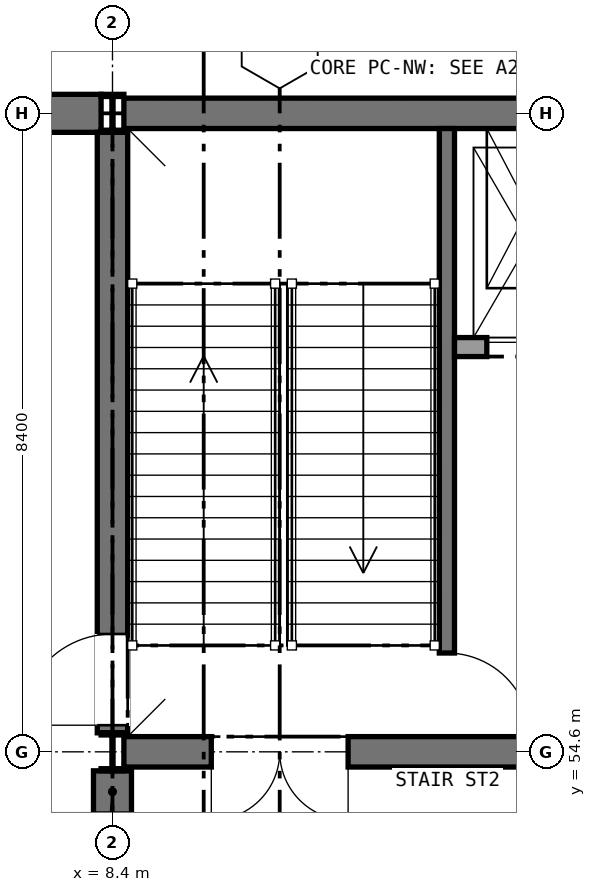
"""IFC4 building model, lengths in metres.
Left out: names, types, materials, properties, quantities, classifications, styles, units other than length and angle.
Written with IfcOpenShell. Run it as: python <this file> out.ifc"""

import sys

from ifc_helpers import new_model, si_unit, direction, frame, frame_2d, origin, origin_2d, place, context, subcontext, project, spatial, rectangle, i_section, extrude, element, fill, save


model = new_model("IFC4")
c1 = context("Model", 3, precision=1e-05, world=origin(), true_north=direction((0.0, 1.0)))
c2 = subcontext(c1, "Body", "Model", "MODEL_VIEW")
j1 = project(units=[si_unit("LENGTHUNIT", "METRE"), si_unit("PLANEANGLEUNIT", "RADIAN")], contexts=[c1])
p1 = place(None, origin())
s1 = spatial("IfcSite", under=j1, at=p1, CompositionType="ELEMENT")
p2 = place(p1, origin())
s2 = spatial("IfcBuilding", under=s1, at=p2, CompositionType="ELEMENT")
p3 = place(p2, origin())
s3 = spatial("IfcBuildingStorey", under=s2, at=p3, CompositionType="ELEMENT", Elevation=0.0)
p4 = place(p3, frame((0.305, 63.0, 0.0), z_axis=(0.0, 0.0, 1.0), x_axis=(1.0, 0.0, 0.0)))
e1 = element("IfcWall", 1, at=p4, inside=s3, PredefinedType="SHEAR", context=c2, shape_type="SweptSolid", body=[
    extrude(rectangle(XDim=7.945, YDim=0.5, at=frame_2d((3.973, 0.0))), origin(), (0.0, 0.0, 1.0), 6.0),
])
p5 = place(p3, frame((8.55, 63.0, 0.0), z_axis=(0.0, 0.0, 1.0), x_axis=(1.0, 0.0, 0.0)))
e2 = element("IfcWall", 2, at=p5, inside=s3, PredefinedType="SHEAR", context=c2, shape_type="SweptSolid", body=[
    extrude(rectangle(XDim=8.1, YDim=0.4, at=frame_2d((4.05, 0.0))), origin(), (0.0, 0.0, 1.0), 5.85),
])
p6 = place(p3, frame((8.55, 54.6, 0.0), z_axis=(0.0, 0.0, 1.0), x_axis=(1.0, 0.0, 0.0)))
e3 = element("IfcWall", 3, at=p6, inside=s3, PredefinedType="SHEAR", context=c2, shape_type="SweptSolid", body=[
    extrude(rectangle(XDim=8.1, YDim=0.4, at=frame_2d((4.05, 0.0))), origin(), (0.0, 0.0, 1.0), 5.85),
])
p7 = place(p6, frame((1.15, 0.0, 0.0)))
e4 = element("IfcOpeningElement", 4, at=p7, cuts=e3, PredefinedType="OPENING", context=c2, shape_type="SweptSolid", body=[
    extrude(rectangle(XDim=1.8, YDim=2.1, at=frame_2d((0.9, 1.05))), frame((0.0, 0.21, 0.0), z_axis=(0.0, -1.0, 0.0), x_axis=(1.0, 0.0, 0.0)), (0.0, 0.0, 1.0), 0.42),
])
p8 = place(p6, frame((5.3, 0.0, 0.0)))
e5 = element("IfcOpeningElement", 5, at=p8, cuts=e3, PredefinedType="OPENING", context=c2, shape_type="SweptSolid", body=[
    extrude(rectangle(XDim=1.8, YDim=2.1, at=frame_2d((0.9, 1.05))), frame((0.0, 0.21, 0.0), z_axis=(0.0, -1.0, 0.0), x_axis=(1.0, 0.0, 0.0)), (0.0, 0.0, 1.0), 0.42),
])
p9 = place(p3, frame((8.4, 54.85, 0.0), z_axis=(0.0, 0.0, 1.0), x_axis=(0.0, 1.0, 0.0)))
e6 = element("IfcWall", 6, at=p9, inside=s3, PredefinedType="SHEAR", context=c2, shape_type="SweptSolid", body=[
    extrude(rectangle(XDim=7.9, YDim=0.4, at=frame_2d((3.95, 0.0))), origin(), (0.0, 0.0, 1.0), 5.85),
])
p10 = place(p9, frame((0.1, 0.0, 0.0)))
e7 = element("IfcOpeningElement", 7, at=p10, cuts=e6, PredefinedType="OPENING", context=c2, shape_type="SweptSolid", body=[
    extrude(rectangle(XDim=1.2, YDim=2.1, at=frame_2d((0.6, 1.05))), frame((0.0, 0.21, 0.0), z_axis=(0.0, -1.0, 0.0), x_axis=(1.0, 0.0, 0.0)), (0.0, 0.0, 1.0), 0.42),
])
for number, where, z_axis, x_axis in (
    (8, (8.4, 54.6, 0.0), (0.0, 0.0, 1.0), (1.0, 0.0, 0.0)),
    (9, (8.4, 63.0, 0.0), (0.0, 0.0, 1.0), (1.0, 0.0, 0.0)),
):
    element("IfcColumn", number, at=place(p3, frame(where, z_axis=z_axis, x_axis=x_axis)), inside=s3, PredefinedType="COLUMN", context=c2, shape_type="SweptSolid", body=[
        extrude(i_section(OverallWidth=0.3, OverallDepth=0.5, WebThickness=0.014, FlangeThickness=0.028, FilletRadius=0.027, at=origin_2d()), origin(), (0.0, 0.0, 1.0), 6.0),
    ])
p11 = place(p3, frame((8.4, 46.45, 0.0), z_axis=(0.0, 0.0, 1.0), x_axis=(0.0, 1.0, 0.0)))
e10 = element("IfcWall", 10, at=p11, inside=s3, PredefinedType="STANDARD", context=c2, shape_type="SweptSolid", body=[
    extrude(rectangle(XDim=7.9, YDim=0.5, at=frame_2d((3.95, 0.0))), origin(), (0.0, 0.0, 1.0), 5.85),
])
p12 = place(p11, frame((0.55, 0.0, 0.0)))
e11 = element("IfcOpeningElement", 11, at=p12, cuts=e10, PredefinedType="OPENING", context=c2, shape_type="SweptSolid", body=[
    extrude(rectangle(XDim=2.6, YDim=3.0, at=frame_2d((1.3, 1.5))), frame((0.0, 0.26, 0.0), z_axis=(0.0, -1.0, 0.0), x_axis=(1.0, 0.0, 0.0)), (0.0, 0.0, 1.0), 0.52),
])
p13 = place(p11, frame((4.75, 0.0, 0.0)))
e12 = element("IfcOpeningElement", 12, at=p13, cuts=e10, PredefinedType="OPENING", context=c2, shape_type="SweptSolid", body=[
    extrude(rectangle(XDim=2.6, YDim=3.0, at=frame_2d((1.3, 1.5))), frame((0.0, 0.26, 0.0), z_axis=(0.0, -1.0, 0.0), x_axis=(1.0, 0.0, 0.0)), (0.0, 0.0, 1.0), 0.52),
])
p14 = place(p3, frame((12.8, 62.8, 0.0), z_axis=(0.0, 0.0, 1.0), x_axis=(0.0, -1.0, 0.0)))
e13 = element("IfcWall", 13, at=p14, inside=s3, PredefinedType="SHEAR", context=c2, shape_type="SweptSolid", body=[
    extrude(rectangle(XDim=8.0, YDim=0.2, at=frame_2d((4.0, 0.0))), origin(), (0.0, 0.0, 1.0), 5.85),
])
p15 = place(p14, frame((6.9, 0.0, 0.0)))
e14 = element("IfcOpeningElement", 14, at=p15, cuts=e13, PredefinedType="OPENING", context=c2, shape_type="SweptSolid", body=[
    extrude(rectangle(XDim=1.11, YDim=2.1, at=frame_2d((0.555, 1.05))), frame((0.0, 0.11, 0.0), z_axis=(0.0, -1.0, 0.0), x_axis=(1.0, 0.0, 0.0)), (0.0, 0.0, 1.0), 0.22),
])
p16 = place(p3, frame((12.9, 59.925, 0.0), z_axis=(0.0, 0.0, 1.0), x_axis=(1.0, 0.0, 0.0)))
e15 = element("IfcWall", 15, at=p16, inside=s3, PredefinedType="SOLIDWALL", context=c2, shape_type="SweptSolid", body=[
    extrude(rectangle(XDim=1.95, YDim=0.25, at=frame_2d((0.975, 0.0))), origin(), (0.0, 0.0, 1.0), 6.0),
])
p17 = place(p16, frame((0.425, 0.0, 0.0)))
e16 = element("IfcOpeningElement", 16, at=p17, cuts=e15, PredefinedType="OPENING", context=c2, shape_type="SweptSolid", body=[
    extrude(rectangle(XDim=1.1, YDim=2.1, at=frame_2d((0.55, 1.05))), frame((0.0, 0.135, 0.0), z_axis=(0.0, -1.0, 0.0), x_axis=(1.0, 0.0, 0.0)), (0.0, 0.0, 1.0), 0.27),
])
p18 = place(p15, origin())
e17 = element("IfcDoor", 17, at=p18, inside=s3, OperationType="SINGLE_SWING_RIGHT", PredefinedType="DOOR", context=c2, shape_type="SweptSolid", body=[
    extrude(rectangle(XDim=1.1, YDim=2.1, at=frame_2d((0.55, 1.05))), frame((0.0, 0.025, 0.0), z_axis=(0.0, -1.0, 0.0), x_axis=(1.0, 0.0, 0.0)), (0.0, 0.0, 1.0), 0.05),
])
fill(e14, e17)
p19 = place(p17, frame((1.1, 0.0, 0.0), z_axis=(0.0, 0.0, 1.0), x_axis=(-1.0, 0.0, 0.0)))
e18 = element("IfcDoor", 18, at=p19, inside=s3, OperationType="SLIDING_TO_RIGHT", PredefinedType="DOOR", context=c2, shape_type="SweptSolid", body=[
    extrude(rectangle(XDim=1.1, YDim=2.1, at=frame_2d((0.55, 1.05))), frame((0.0, 0.025, 0.0), z_axis=(0.0, -1.0, 0.0), x_axis=(1.0, 0.0, 0.0)), (0.0, 0.0, 1.0), 0.05),
])
fill(e16, e18)
p20 = place(p7, frame((1.8, 0.0, 0.0), z_axis=(0.0, 0.0, 1.0), x_axis=(-1.0, 0.0, 0.0)))
e19 = element("IfcDoor", 19, at=p20, inside=s3, OperationType="DOUBLE_DOOR_SINGLE_SWING", PredefinedType="DOOR", context=c2, shape_type="SweptSolid", body=[
    extrude(rectangle(XDim=1.8, YDim=2.1, at=frame_2d((0.9, 1.05))), frame((0.0, 0.025, 0.0), z_axis=(0.0, -1.0, 0.0), x_axis=(1.0, 0.0, 0.0)), (0.0, 0.0, 1.0), 0.05),
])
fill(e4, e19)
p21 = place(p10, origin())
e20 = element("IfcDoor", 20, at=p21, inside=s3, OperationType="SINGLE_SWING_LEFT", PredefinedType="DOOR", context=c2, shape_type="SweptSolid", body=[
    extrude(rectangle(XDim=1.2, YDim=2.1, at=frame_2d((0.6, 1.05))), frame((0.0, 0.025, 0.0), z_axis=(0.0, -1.0, 0.0), x_axis=(1.0, 0.0, 0.0)), (0.0, 0.0, 1.0), 0.05),
])
fill(e7, e20)
save(model, sys.argv[1])
